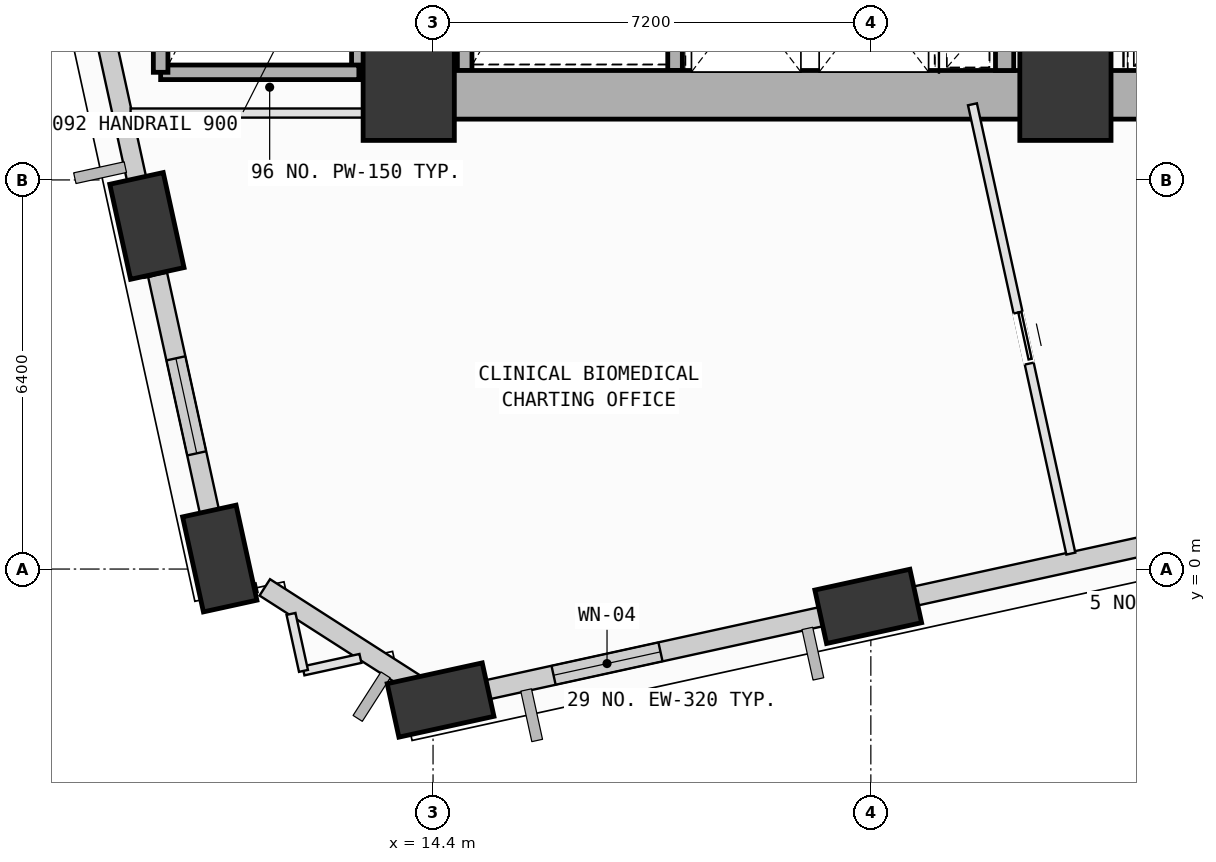
"""IFC4 building model, lengths in metres.
Left out: names, types, materials, properties, quantities, classifications, styles, units other than length and angle.
Written with IfcOpenShell. Run it as: python <this file> out.ifc"""

import sys

from ifc_helpers import new_model, si_unit, direction, frame, frame_2d, origin, origin_2d, place, context, subcontext, project, spatial, rectangle, extrude, element, fill, save


model = new_model("IFC4")
c1 = context("Model", 3, precision=1e-05, world=origin(), true_north=direction((0.0, 1.0)))
c2 = subcontext(c1, "Body", "Model", "MODEL_VIEW")
j1 = project(units=[si_unit("LENGTHUNIT", "METRE"), si_unit("PLANEANGLEUNIT", "RADIAN")], contexts=[c1])
p1 = place(None, origin())
s1 = spatial("IfcSite", under=j1, at=p1, CompositionType="ELEMENT")
p2 = place(p1, origin())
s2 = spatial("IfcBuilding", under=s1, at=p2, CompositionType="ELEMENT")
p3 = place(p2, frame((0.0, 0.0, 75.0)))
s3 = spatial("IfcBuildingStorey", under=s2, at=p3, CompositionType="ELEMENT", Elevation=75.0)
for number, where, z_axis, x_axis in (
    (1, (14.0, 7.8, 0.0), (0.0, 0.0, 1.0), (1.0, 0.0, 0.0)),
    (2, (24.8, 7.8, 0.0), (0.0, 0.0, 1.0), (1.0, 0.0, 0.0)),
):
    element("IfcColumn", number, at=place(p3, frame(where, z_axis=z_axis, x_axis=x_axis)), inside=s3, PredefinedType="COLUMN", context=c2, shape_type="SweptSolid", body=[
        extrude(rectangle(XDim=1.5, YDim=1.5, at=origin_2d()), origin(), (0.0, 0.0, 1.0), 4.0),
    ])
p4 = place(p3, frame((14.524, -2.154, 0.002), z_axis=(0.111362204381, -0.077408836632, 0.990760481371), x_axis=(0.383556166943, 0.923061878571, 0.029007501253)))
e3 = element("IfcColumn", 3, at=p4, inside=s3, PredefinedType="COLUMN", context=c2, shape_type="SweptSolid", body=[
    extrude(rectangle(XDim=1.6, YDim=0.9, at=origin_2d()), origin(), (0.0, 0.0, 1.0), 4.034),
])
p5 = place(p3, frame((21.557, -0.614, 0.002), z_axis=(0.10503105755, -0.048723246223, 0.99327464592), x_axis=(0.218362783121, 0.975553406611, 0.024763800118)))
e4 = element("IfcColumn", 4, at=p5, inside=s3, PredefinedType="COLUMN", context=c2, shape_type="SweptSolid", body=[
    extrude(rectangle(XDim=1.6, YDim=0.9, at=origin_2d()), origin(), (0.0, 0.0, 1.0), 4.024),
])
p6 = place(p3, frame((9.694, 5.644, 0.002), z_axis=(0.079628753568, -0.097687633753, 0.992026404798), x_axis=(-0.778064059235, 0.616002693059, 0.123113776118)))
e5 = element("IfcColumn", 5, at=p6, inside=s3, PredefinedType="COLUMN", context=c2, shape_type="SweptSolid", body=[
    extrude(rectangle(XDim=1.6, YDim=0.9, at=origin_2d()), origin(), (0.0, 0.0, 1.0), 4.029),
])
p7 = place(p3, frame((10.892, 0.173, 0.002), z_axis=(0.101893356585, -0.092393797806, 0.990495396259), x_axis=(-0.860446578039, 0.491506131497, 0.134362974967)))
e6 = element("IfcColumn", 6, at=p7, inside=s3, PredefinedType="COLUMN", context=c2, shape_type="SweptSolid", body=[
    extrude(rectangle(XDim=1.6, YDim=0.9, at=origin_2d()), origin(), (0.0, 0.0, 1.0), 4.035),
])
p8 = place(p3, frame((21.161, -0.701, 0.0), z_axis=(0.0, 0.0, 1.0), x_axis=(-0.976863843637, -0.213862177571, 0.0)))
e7 = element("IfcWall", 7, at=p8, inside=s3, PredefinedType="SOLIDWALL", context=c2, shape_type="SweptSolid", body=[
    extrude(rectangle(XDim=6.034, YDim=0.32, at=frame_2d((3.017, 0.0))), origin(), (0.0, 0.0, 1.0), 3.165),
])
p9 = place(p8, frame((3.092, 0.0, 0.75)))
e8 = element("IfcOpeningElement", 8, at=p9, cuts=e7, PredefinedType="OPENING", context=c2, shape_type="SweptSolid", body=[
    extrude(rectangle(XDim=1.8, YDim=2.05, at=frame_2d((0.9, 1.025))), frame((0.0, 0.17, 0.0), z_axis=(0.0, -1.0, 0.0), x_axis=(1.0, 0.0, 0.0)), (0.0, 0.0, 1.0), 0.34),
])
p10 = place(p3, frame((28.183, 0.837, 0.0), z_axis=(0.0, 0.0, 1.0), x_axis=(-0.976853849755, -0.213907821782, 0.0)))
e9 = element("IfcWall", 9, at=p10, inside=s3, PredefinedType="SOLIDWALL", context=c2, shape_type="SweptSolid", body=[
    extrude(rectangle(XDim=6.006, YDim=0.32, at=frame_2d((3.003, 0.0))), origin(), (0.0, 0.0, 1.0), 3.165),
])
p11 = place(p10, frame((0.888, 0.0, 0.75)))
e10 = element("IfcOpeningElement", 10, at=p11, cuts=e9, PredefinedType="OPENING", context=c2, shape_type="SweptSolid", body=[
    extrude(rectangle(XDim=1.2, YDim=1.75, at=frame_2d((0.6, 0.875))), frame((0.0, 0.17, 0.0), z_axis=(0.0, -1.0, 0.0), x_axis=(1.0, 0.0, 0.0)), (0.0, 0.0, 1.0), 0.34),
])
p12 = place(p3, frame((9.615, 6.005, 0.0), z_axis=(0.0, 0.0, 1.0), x_axis=(-0.213886269433, 0.976858568959, 0.0)))
e11 = element("IfcWall", 11, at=p12, inside=s3, PredefinedType="SOLIDWALL", context=c2, shape_type="SweptSolid", body=[
    extrude(rectangle(XDim=5.997, YDim=0.32, at=frame_2d((2.999, 0.0))), origin(), (0.0, 0.0, 1.0), 3.165),
])
p13 = place(p12, frame((2.889, 0.0, 0.75)))
e12 = element("IfcOpeningElement", 12, at=p13, cuts=e11, PredefinedType="OPENING", context=c2, shape_type="SweptSolid", body=[
    extrude(rectangle(XDim=1.2, YDim=1.75, at=frame_2d((0.6, 0.875))), frame((0.0, 0.17, 0.0), z_axis=(0.0, -1.0, 0.0), x_axis=(1.0, 0.0, 0.0)), (0.0, 0.0, 1.0), 0.34),
])
p14 = place(p3, frame((10.815, 0.525, 0.0), z_axis=(0.0, 0.0, 1.0), x_axis=(-0.213879872246, 0.976859969621, 0.0)))
e13 = element("IfcWall", 13, at=p14, inside=s3, PredefinedType="SOLIDWALL", context=c2, shape_type="SweptSolid", body=[
    extrude(rectangle(XDim=4.417, YDim=0.32, at=frame_2d((2.208, 0.0))), origin(), (0.0, 0.0, 1.0), 3.165),
])
p15 = place(p14, frame((1.411, 0.0, 0.75)))
e14 = element("IfcOpeningElement", 14, at=p15, cuts=e13, PredefinedType="OPENING", context=c2, shape_type="SweptSolid", body=[
    extrude(rectangle(XDim=1.6, YDim=1.95, at=frame_2d((0.8, 0.975))), frame((0.0, 0.17, 0.0), z_axis=(0.0, -1.0, 0.0), x_axis=(1.0, 0.0, 0.0)), (0.0, 0.0, 1.0), 0.34),
])
p16 = place(p3, frame((14.242, -1.973, 0.0), z_axis=(0.0, 0.0, 1.0), x_axis=(-0.841996590961, 0.539482845705, 0.0)))
e15 = element("IfcWall", 15, at=p16, inside=s3, PredefinedType="SOLIDWALL", context=c2, shape_type="SweptSolid", body=[
    extrude(rectangle(XDim=3.099, YDim=0.32, at=frame_2d((1.55, 0.0))), origin(), (0.0, 0.0, 1.0), 3.165),
])
for number, where, z_axis, x_axis in (
    (16, (18.38, 15.12, 0.0), (0.0, 0.0, 1.0), (0.0, -1.0, 0.0)),
    (17, (14.92, 8.2, 0.0), (0.0, 0.0, 1.0), (0.0, 1.0, 0.0)),
):
    element("IfcWall", number, at=place(p3, frame(where, z_axis=z_axis, x_axis=x_axis)), inside=s3, PredefinedType="SOLIDWALL", context=c2, shape_type="SweptSolid", body=[
        extrude(rectangle(XDim=6.92, YDim=0.24, at=frame_2d((3.46, 0.0))), origin(), (0.0, 0.0, 1.0), 3.78),
    ])
p17 = place(p3, frame((13.18, 15.22, 0.0), z_axis=(0.0, 0.0, 1.0), x_axis=(0.0, -1.0, 0.0)))
e18 = element("IfcWall", 18, at=p17, inside=s3, PredefinedType="SOLIDWALL", context=c2, shape_type="SweptSolid", body=[
    extrude(rectangle(XDim=7.05, YDim=0.24, at=frame_2d((3.525, 0.0))), origin(), (0.0, 0.0, 1.0), 3.78),
])
p18 = place(p3, frame((13.18, 8.17, 0.0), z_axis=(0.0, 0.0, 1.0), x_axis=(-1.0, 0.0, 0.0)))
e19 = element("IfcWall", 19, at=p18, inside=s3, PredefinedType="SOLIDWALL", context=c2, shape_type="SweptSolid", body=[
    extrude(rectangle(XDim=3.26, YDim=0.24, at=frame_2d((1.63, 0.0))), origin(), (0.0, 0.0, 1.0), 3.78),
])
p19 = place(p3, frame((9.92, 8.17, 0.0), z_axis=(0.0, 0.0, 1.0), x_axis=(0.0, 1.0, 0.0)))
e20 = element("IfcWall", 20, at=p19, inside=s3, PredefinedType="SOLIDWALL", context=c2, shape_type="SweptSolid", body=[
    extrude(rectangle(XDim=7.05, YDim=0.24, at=frame_2d((3.525, 0.0))), origin(), (0.0, 0.0, 1.0), 3.78),
])
for number, where, z_axis, x_axis in (
    (21, (14.0, 7.8, 0.0), (0.0, 0.0, 1.0), (1.0, 0.0, 0.0)),
    (22, (24.8, 7.8, 0.0), (0.0, 0.0, 1.0), (1.0, 0.0, 0.0)),
):
    element("IfcWall", number, at=place(p3, frame(where, z_axis=z_axis, x_axis=x_axis)), inside=s3, PredefinedType="SHEAR", context=c2, shape_type="SweptSolid", body=[
        extrude(rectangle(XDim=10.8, YDim=0.8, at=frame_2d((5.4, 0.0))), origin(), (0.0, 0.0, 1.0), 3.78),
    ])
p20 = place(p3, frame((14.0, 16.8, 0.0), z_axis=(0.0, 0.0, 1.0), x_axis=(0.0, -1.0, 0.0)))
e23 = element("IfcWall", 23, at=p20, inside=s3, PredefinedType="SHEAR", context=c2, shape_type="SweptSolid", body=[
    extrude(rectangle(XDim=9.0, YDim=0.8, at=frame_2d((4.5, 0.0))), origin(), (0.0, 0.0, 1.0), 3.78),
])
p21 = place(p3, frame((23.8, 8.2, 0.0), z_axis=(0.0, 0.0, 1.0), x_axis=(0.0, 1.0, 0.0)))
e24 = element("IfcWall", 24, at=p21, inside=s3, PredefinedType="SOLIDWALL", context=c2, shape_type="SweptSolid", body=[
    extrude(rectangle(XDim=2.48, YDim=0.3, at=frame_2d((1.24, 0.0))), origin(), (0.0, 0.0, 1.0), 3.78),
])
p22 = place(p3, frame((9.426, 7.5, 0.0), z_axis=(0.0, 0.0, 1.0), x_axis=(1.0, 0.0, 0.0)))
e25 = element("IfcWall", 25, at=p22, inside=s3, PredefinedType="PARTITIONING", context=c2, shape_type="SweptSolid", body=[
    extrude(rectangle(XDim=4.574, YDim=0.15, at=frame_2d((2.287, 0.0))), origin(), (0.0, 0.0, 1.0), 3.78),
])
p23 = place(p3, frame((15.315, -2.216, 0.0), z_axis=(0.0, 0.0, 1.0), x_axis=(-0.976816757291, -0.214077141881, 0.0)))
e26 = element("IfcWall", 26, at=p23, inside=s3, PredefinedType="PARTITIONING", context=c2, shape_type="SweptSolid", body=[
    extrude(rectangle(XDim=1.359, YDim=0.15, at=frame_2d((0.68, 0.0))), origin(), (0.0, 0.0, 1.0), 3.165),
])
p24 = place(p3, frame((13.987, -2.507, 0.0), z_axis=(0.0, 0.0, 1.0), x_axis=(-0.214380618692, 0.976750198531, 0.0)))
e27 = element("IfcWall", 27, at=p24, inside=s3, PredefinedType="PARTITIONING", context=c2, shape_type="SweptSolid", body=[
    extrude(rectangle(XDim=0.639, YDim=0.15, at=frame_2d((0.319, 0.0))), origin(), (0.0, 0.0, 1.0), 3.78),
])
for number, where, z_axis, x_axis in (
    (28, (13.206, -1.47, 0.0), (0.0, 0.0, 1.0), (-0.977, -0.214, 0.0)),
    (29, (12.269, -1.675, 0.0), (0.0, 0.0, 1.0), (-0.214, 0.977, 0.0)),
):
    element("IfcWall", number, at=place(p3, frame(where, z_axis=z_axis, x_axis=x_axis)), inside=s3, PredefinedType="PARTITIONING", context=c2, shape_type="SweptSolid", body=[
        extrude(rectangle(XDim=0.959, YDim=0.15, at=frame_2d((0.479, 0.0))), origin(), (0.0, 0.0, 1.0), 3.78),
    ])
p25 = place(p3, frame((11.498, -0.308, 0.0), z_axis=(0.0, 0.0, 1.0), x_axis=(-0.976750198531, -0.214380618692, 0.0)))
e30 = element("IfcWall", 30, at=p25, inside=s3, PredefinedType="PARTITIONING", context=c2, shape_type="SweptSolid", body=[
    extrude(rectangle(XDim=0.639, YDim=0.15, at=frame_2d((0.319, 0.0))), origin(), (0.0, 0.0, 1.0), 3.78),
])
p26 = place(p3, frame((10.874, -0.445, 0.0), z_axis=(0.0, 0.0, 1.0), x_axis=(-0.213590712542, 0.976923235222, 0.0)))
e31 = element("IfcWall", 31, at=p26, inside=s3, PredefinedType="PARTITIONING", context=c2, shape_type="SweptSolid", body=[
    extrude(rectangle(XDim=0.96, YDim=0.15, at=frame_2d((0.48, 0.0))), origin(), (0.0, 0.0, 1.0), 3.78),
])
p27 = place(p3, frame((9.724, 4.807, 0.0), z_axis=(0.0, 0.0, 1.0), x_axis=(-0.214526259272, 0.976718221435, 0.0)))
e32 = element("IfcWall", 32, at=p27, inside=s3, PredefinedType="PARTITIONING", context=c2, shape_type="SweptSolid", body=[
    extrude(rectangle(XDim=1.194, YDim=0.15, at=frame_2d((0.597, 0.0))), origin(), (0.0, 0.0, 1.0), 3.165),
])
p28 = place(p3, frame((22.365, -0.672, 0.0), z_axis=(0.0, 0.0, 1.0), x_axis=(-0.976852847871, -0.21391239704, 0.0)))
e33 = element("IfcWall", 33, at=p28, inside=s3, PredefinedType="PARTITIONING", context=c2, shape_type="SweptSolid", body=[
    extrude(rectangle(XDim=1.182, YDim=0.15, at=frame_2d((0.591, 0.0))), origin(), (0.0, 0.0, 1.0), 3.165),
])
p29 = place(p3, frame((23.271, 7.644, 0.0), z_axis=(0.0, 0.0, 1.0), x_axis=(0.213864339453, -0.976863370339, 0.0)))
e34 = element("IfcWall", 34, at=p29, inside=s3, PredefinedType="PARTITIONING", context=c2, shape_type="SweptSolid", body=[
    extrude(rectangle(XDim=7.565, YDim=0.15, at=frame_2d((3.783, 0.0))), origin(), (0.0, 0.0, 1.0), 3.78),
])
p30 = place(p29, frame((3.506, 0.0, 0.0)))
e35 = element("IfcOpeningElement", 35, at=p30, cuts=e34, PredefinedType="OPENING", context=c2, shape_type="SweptSolid", body=[
    extrude(rectangle(XDim=0.86, YDim=2.06, at=frame_2d((0.43, 1.03))), frame((0.0, 0.085, 0.0), z_axis=(0.0, -1.0, 0.0), x_axis=(1.0, 0.0, 0.0)), (0.0, 0.0, 1.0), 0.17),
])
p31 = place(p9, origin())
e36 = element("IfcWindow", 36, at=p31, inside=s3, PartitioningType="SINGLE_PANEL", PredefinedType="WINDOW", context=c2, shape_type="SweptSolid", body=[
    extrude(rectangle(XDim=1.8, YDim=2.05, at=frame_2d((0.9, 1.025))), frame((0.0, 0.03, 0.0), z_axis=(0.0, -1.0, 0.0), x_axis=(1.0, 0.0, 0.0)), (0.0, 0.0, 1.0), 0.06),
])
fill(e8, e36)
p32 = place(p15, origin())
e37 = element("IfcWindow", 37, at=p32, inside=s3, PartitioningType="SINGLE_PANEL", PredefinedType="WINDOW", context=c2, shape_type="SweptSolid", body=[
    extrude(rectangle(XDim=1.6, YDim=1.95, at=frame_2d((0.8, 0.975))), frame((0.0, 0.03, 0.0), z_axis=(0.0, -1.0, 0.0), x_axis=(1.0, 0.0, 0.0)), (0.0, 0.0, 1.0), 0.06),
])
fill(e14, e37)
p33 = place(p30, origin())
e38 = element("IfcDoor", 38, at=p33, inside=s3, OperationType="SLIDING_TO_LEFT", PredefinedType="DOOR", context=c2, shape_type="SweptSolid", body=[
    extrude(rectangle(XDim=0.86, YDim=2.06, at=frame_2d((0.43, 1.03))), frame((0.0, 0.025, 0.0), z_axis=(0.0, -1.0, 0.0), x_axis=(1.0, 0.0, 0.0)), (0.0, 0.0, 1.0), 0.05),
])
fill(e35, e38)
save(model, sys.argv[1])
